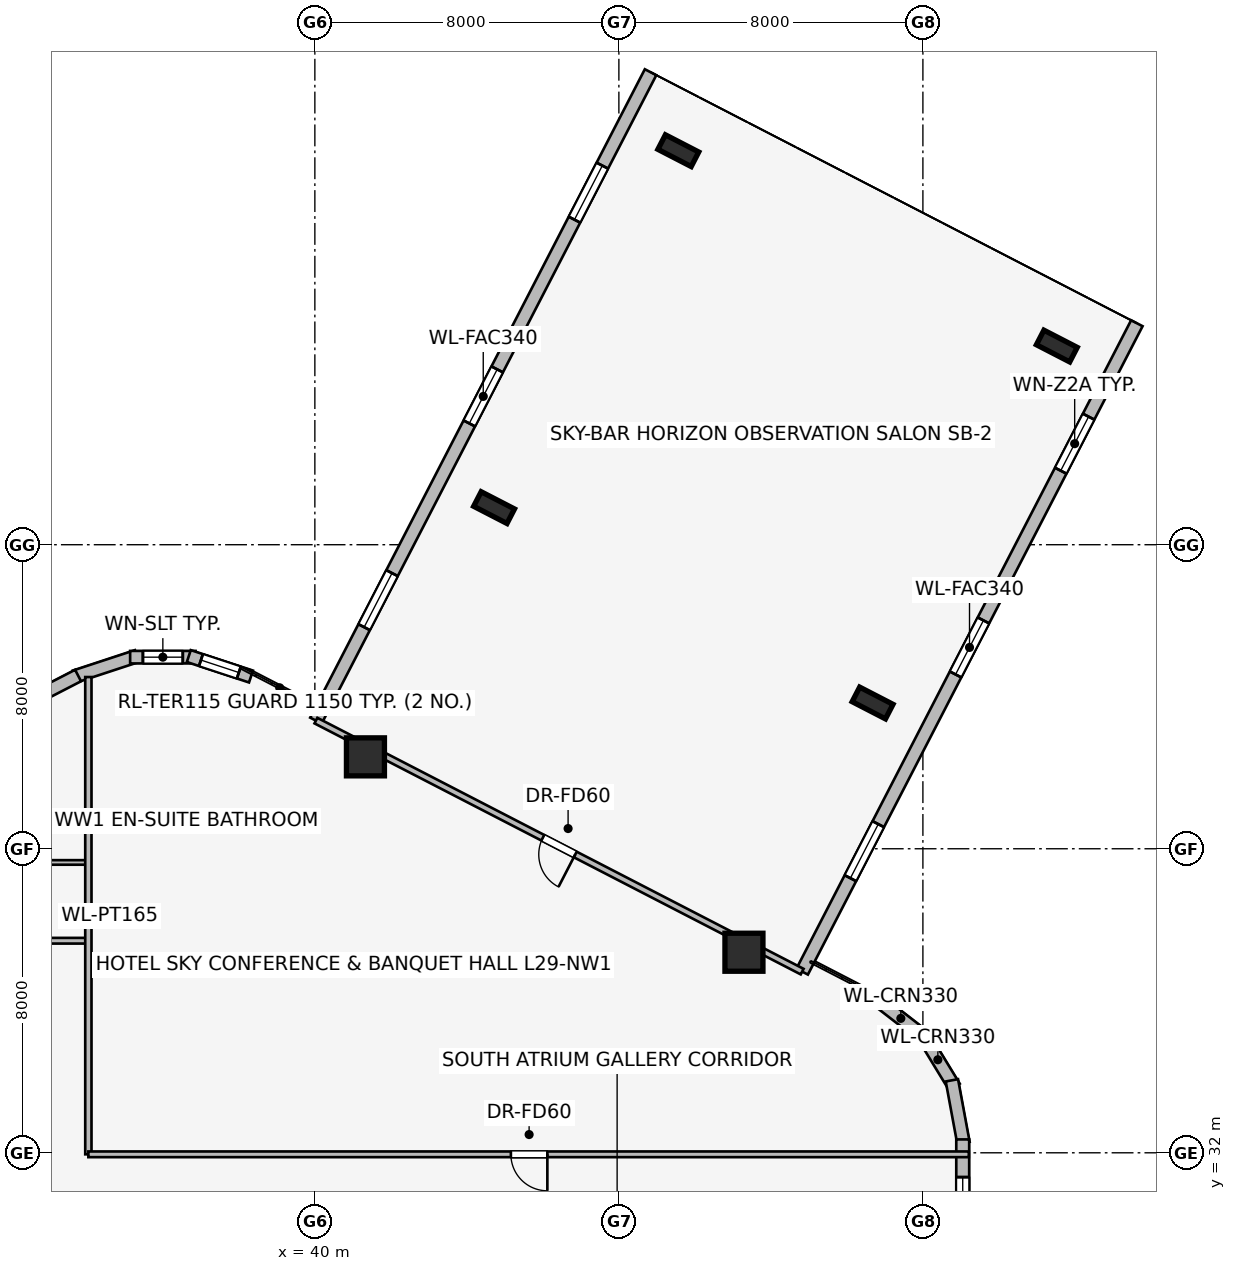
"""IFC4 building model, lengths in metres.
Left out: names, types, materials, properties, quantities, classifications, styles, units other than length and angle.
Written with IfcOpenShell. Run it as: python <this file> out.ifc"""

import sys

from ifc_helpers import new_model, si_unit, direction, frame, frame_2d, origin, origin_2d, place, context, subcontext, project, spatial, rectangle, i_section, extrude, element, fill, save


model = new_model("IFC4")
c1 = context("Model", 3, precision=1e-05, world=origin(), true_north=direction((0.0, 1.0)))
c2 = subcontext(c1, "Body", "Model", "MODEL_VIEW")
j1 = project(units=[si_unit("LENGTHUNIT", "METRE"), si_unit("PLANEANGLEUNIT", "RADIAN")], contexts=[c1])
p1 = place(None, origin())
s1 = spatial("IfcSite", under=j1, at=p1, CompositionType="ELEMENT")
p2 = place(p1, origin())
s2 = spatial("IfcBuilding", under=s1, at=p2, CompositionType="ELEMENT")
p3 = place(p2, frame((0.0, 0.0, 111.9)))
s3 = spatial("IfcBuildingStorey", under=s2, at=p3, CompositionType="ELEMENT", Elevation=111.9)
for number, where, z_axis, x_axis in (
    (1, (51.291, 37.277, 0.0), (0.0, 0.0, 1.0), (1.0, 0.0, 0.0)),
    (2, (41.331, 42.418, 0.0), (0.0, 0.0, 1.0), (1.0, 0.0, 0.0)),
):
    element("IfcColumn", number, at=place(p3, frame(where, z_axis=z_axis, x_axis=x_axis)), inside=s3, PredefinedType="COLUMN", context=c2, shape_type="SweptSolid", body=[
        extrude(rectangle(XDim=1.0, YDim=1.0, at=origin_2d()), origin(), (0.0, 0.0, 1.0), 3.45),
    ])
for number, where, z_axis, x_axis in (
    (3, (54.676, 43.835, -0.29), (0.0, 0.0, 1.0), (0.459, 0.889, 0.0)),
    (4, (44.716, 48.976, -0.29), (0.0, 0.0, 1.0), (0.459, 0.889, 0.0)),
    (5, (59.524, 53.227, -0.29), (0.0, 0.0, 1.0), (0.459, 0.889, 0.0)),
    (6, (49.564, 58.368, -0.29), (0.0, 0.0, 1.0), (0.459, 0.889, 0.0)),
):
    element("IfcColumn", number, at=place(p3, frame(where, z_axis=z_axis, x_axis=x_axis)), inside=s3, PredefinedType="COLUMN", context=c2, shape_type="SweptSolid", body=[
        extrude(i_section(OverallWidth=0.431, OverallDepth=0.987, WebThickness=0.034, FlangeThickness=0.062, at=origin_2d()), origin(), (0.0, 0.0, 1.0), 3.74),
    ])
p4 = place(p3, frame((54.757, 36.05, 0.0), z_axis=(0.0, 0.0, 1.0), x_axis=(0.790621329885, -0.612305408053, 0.0)))
e7 = element("IfcWall", 7, at=p4, inside=s3, PredefinedType="STANDARD", context=c2, shape_type="SweptSolid", body=[
    extrude(rectangle(XDim=1.676, YDim=0.33, at=frame_2d((0.838, 0.0))), origin(), (0.0, 0.0, 1.0), 3.16),
])
p5 = place(p3, frame((55.957, 35.164, 0.0), z_axis=(0.0, 0.0, 1.0), x_axis=(0.520519429557, -0.853849824883, 0.0)))
e8 = element("IfcWall", 8, at=p5, inside=s3, PredefinedType="STANDARD", context=c2, shape_type="SweptSolid", body=[
    extrude(rectangle(XDim=1.677, YDim=0.33, at=frame_2d((0.839, 0.0))), origin(), (0.0, 0.0, 1.0), 3.16),
])
p6 = place(p3, frame((56.763, 33.907, 0.0), z_axis=(0.0, 0.0, 1.0), x_axis=(0.181984991895, -0.983301308209, 0.0)))
e9 = element("IfcWall", 9, at=p6, inside=s3, PredefinedType="STANDARD", context=c2, shape_type="SweptSolid", body=[
    extrude(rectangle(XDim=1.677, YDim=0.33, at=frame_2d((0.838, 0.0))), origin(), (0.0, 0.0, 1.0), 3.16),
])
p7 = place(p3, frame((61.63, 53.828, 0.0), z_axis=(0.0, 0.0, 1.0), x_axis=(-0.458697010696, -0.888592737073, 0.0)))
e10 = element("IfcWall", 10, at=p7, inside=s3, PredefinedType="STANDARD", context=c2, shape_type="SweptSolid", body=[
    extrude(rectangle(XDim=19.2, YDim=0.34, at=frame_2d((9.6, 0.0))), origin(), (0.0, 0.0, 1.0), 3.16),
])
p8 = place(p7, frame((2.767, 0.0, 0.75)))
e11 = element("IfcOpeningElement", 11, at=p8, cuts=e10, PredefinedType="OPENING", context=c2, shape_type="SweptSolid", body=[
    extrude(rectangle(XDim=1.6, YDim=1.55, at=frame_2d((0.8, 0.775))), frame((0.0, 0.18, 0.0), z_axis=(0.0, -1.0, 0.0), x_axis=(1.0, 0.0, 0.0)), (0.0, 0.0, 1.0), 0.36),
])
p9 = place(p7, frame((8.8, 0.0, 0.75)))
e12 = element("IfcOpeningElement", 12, at=p9, cuts=e10, PredefinedType="OPENING", context=c2, shape_type="SweptSolid", body=[
    extrude(rectangle(XDim=1.6, YDim=1.55, at=frame_2d((0.8, 0.775))), frame((0.0, 0.18, 0.0), z_axis=(0.0, -1.0, 0.0), x_axis=(1.0, 0.0, 0.0)), (0.0, 0.0, 1.0), 0.36),
])
p10 = place(p7, frame((14.833, 0.0, 0.75)))
e13 = element("IfcOpeningElement", 13, at=p10, cuts=e10, PredefinedType="OPENING", context=c2, shape_type="SweptSolid", body=[
    extrude(rectangle(XDim=1.6, YDim=1.55, at=frame_2d((0.8, 0.775))), frame((0.0, 0.18, 0.0), z_axis=(0.0, -1.0, 0.0), x_axis=(1.0, 0.0, 0.0)), (0.0, 0.0, 1.0), 0.36),
])
p11 = place(p3, frame((40.028, 43.372, 0.0), z_axis=(0.0, 0.0, 1.0), x_axis=(0.45865166523, 0.888616143215, 0.0)))
e14 = element("IfcWall", 14, at=p11, inside=s3, PredefinedType="STANDARD", context=c2, shape_type="SweptSolid", body=[
    extrude(rectangle(XDim=19.199, YDim=0.34, at=frame_2d((9.6, 0.0))), origin(), (0.0, 0.0, 1.0), 3.16),
])
p12 = place(p11, frame((2.767, 0.0, 0.75)))
e15 = element("IfcOpeningElement", 15, at=p12, cuts=e14, PredefinedType="OPENING", context=c2, shape_type="SweptSolid", body=[
    extrude(rectangle(XDim=1.6, YDim=1.55, at=frame_2d((0.8, 0.775))), frame((0.0, 0.18, 0.0), z_axis=(0.0, -1.0, 0.0), x_axis=(1.0, 0.0, 0.0)), (0.0, 0.0, 1.0), 0.36),
])
p13 = place(p11, frame((8.8, 0.0, 0.75)))
e16 = element("IfcOpeningElement", 16, at=p13, cuts=e14, PredefinedType="OPENING", context=c2, shape_type="SweptSolid", body=[
    extrude(rectangle(XDim=1.6, YDim=1.55, at=frame_2d((0.8, 0.775))), frame((0.0, 0.18, 0.0), z_axis=(0.0, -1.0, 0.0), x_axis=(1.0, 0.0, 0.0)), (0.0, 0.0, 1.0), 0.36),
])
p14 = place(p11, frame((14.833, 0.0, 0.75)))
e17 = element("IfcOpeningElement", 17, at=p14, cuts=e14, PredefinedType="OPENING", context=c2, shape_type="SweptSolid", body=[
    extrude(rectangle(XDim=1.6, YDim=1.55, at=frame_2d((0.8, 0.775))), frame((0.0, 0.18, 0.0), z_axis=(0.0, -1.0, 0.0), x_axis=(1.0, 0.0, 0.0)), (0.0, 0.0, 1.0), 0.36),
])
p15 = place(p3, frame((33.681, 44.532, 0.0), z_axis=(0.0, 0.0, 1.0), x_axis=(0.949937416267, 0.312440242569, 0.0)))
e18 = element("IfcWall", 18, at=p15, inside=s3, PredefinedType="STANDARD", context=c2, shape_type="SweptSolid", body=[
    extrude(rectangle(XDim=1.722, YDim=0.33, at=frame_2d((0.861, 0.0))), origin(), (0.0, 0.0, 1.0), 3.16),
])
p16 = place(p3, frame((35.139, 45.041, 0.0), z_axis=(0.0, 0.0, 1.0), x_axis=(1.0, 0.0, 0.0)))
e19 = element("IfcWall", 19, at=p16, inside=s3, PredefinedType="STANDARD", context=c2, shape_type="SweptSolid", body=[
    extrude(rectangle(XDim=1.722, YDim=0.33, at=frame_2d((0.861, 0.0))), origin(), (0.0, 0.0, 1.0), 3.16),
])
p17 = place(p16, frame((0.336, 0.0, 0.75)))
e20 = element("IfcOpeningElement", 20, at=p17, cuts=e19, PredefinedType="OPENING", context=c2, shape_type="SweptSolid", body=[
    extrude(rectangle(XDim=1.05, YDim=1.4, at=frame_2d((0.525, 0.7))), frame((0.0, 0.175, 0.0), z_axis=(0.0, -1.0, 0.0), x_axis=(1.0, 0.0, 0.0)), (0.0, 0.0, 1.0), 0.35),
])
p18 = place(p3, frame((36.683, 45.07, 0.0), z_axis=(0.0, 0.0, 1.0), x_axis=(0.949937416267, -0.312440242569, 0.0)))
e21 = element("IfcWall", 21, at=p18, inside=s3, PredefinedType="STANDARD", context=c2, shape_type="SweptSolid", body=[
    extrude(rectangle(XDim=1.722, YDim=0.33, at=frame_2d((0.861, 0.0))), origin(), (0.0, 0.0, 1.0), 3.16),
])
p19 = place(p18, frame((0.336, 0.0, 0.75)))
e22 = element("IfcOpeningElement", 22, at=p19, cuts=e21, PredefinedType="OPENING", context=c2, shape_type="SweptSolid", body=[
    extrude(rectangle(XDim=1.05, YDim=1.4, at=frame_2d((0.525, 0.7))), frame((0.0, 0.175, 0.0), z_axis=(0.0, -1.0, 0.0), x_axis=(1.0, 0.0, 0.0)), (0.0, 0.0, 1.0), 0.35),
])
p20 = place(p3, frame((17.169, 35.99, 0.0), z_axis=(0.0, 0.0, 1.0), x_axis=(0.888613612362, 0.458656568606, 0.0)))
e23 = element("IfcWall", 23, at=p20, inside=s3, PredefinedType="STANDARD", context=c2, shape_type="SweptSolid", body=[
    extrude(rectangle(XDim=18.681, YDim=0.34, at=frame_2d((9.34, 0.0))), origin(), (0.0, 0.0, 1.0), 3.16),
])
p21 = place(p20, frame((1.023, 0.0, 0.75)))
e24 = element("IfcOpeningElement", 24, at=p21, cuts=e23, PredefinedType="OPENING", context=c2, shape_type="SweptSolid", body=[
    extrude(rectangle(XDim=1.6, YDim=1.55, at=frame_2d((0.8, 0.775))), frame((0.0, 0.18, 0.0), z_axis=(0.0, -1.0, 0.0), x_axis=(1.0, 0.0, 0.0)), (0.0, 0.0, 1.0), 0.36),
])
p22 = place(p20, frame((4.981, 0.0, 0.75)))
e25 = element("IfcOpeningElement", 25, at=p22, cuts=e23, PredefinedType="OPENING", context=c2, shape_type="SweptSolid", body=[
    extrude(rectangle(XDim=2.1, YDim=1.5, at=frame_2d((1.05, 0.75))), frame((0.0, 0.18, 0.0), z_axis=(0.0, -1.0, 0.0), x_axis=(1.0, 0.0, 0.0)), (0.0, 0.0, 1.0), 0.36),
])
p23 = place(p20, frame((8.29, 0.0, 0.75)))
e26 = element("IfcOpeningElement", 26, at=p23, cuts=e23, PredefinedType="OPENING", context=c2, shape_type="SweptSolid", body=[
    extrude(rectangle(XDim=2.1, YDim=1.5, at=frame_2d((1.05, 0.75))), frame((0.0, 0.18, 0.0), z_axis=(0.0, -1.0, 0.0), x_axis=(1.0, 0.0, 0.0)), (0.0, 0.0, 1.0), 0.36),
])
p24 = place(p20, frame((11.6, 0.0, 0.75)))
e27 = element("IfcOpeningElement", 27, at=p24, cuts=e23, PredefinedType="OPENING", context=c2, shape_type="SweptSolid", body=[
    extrude(rectangle(XDim=2.1, YDim=1.5, at=frame_2d((1.05, 0.75))), frame((0.0, 0.18, 0.0), z_axis=(0.0, -1.0, 0.0), x_axis=(1.0, 0.0, 0.0)), (0.0, 0.0, 1.0), 0.36),
])
p25 = place(p20, frame((16.058, 0.0, 0.75)))
e28 = element("IfcOpeningElement", 28, at=p25, cuts=e23, PredefinedType="OPENING", context=c2, shape_type="SweptSolid", body=[
    extrude(rectangle(XDim=1.6, YDim=1.55, at=frame_2d((0.8, 0.775))), frame((0.0, 0.18, 0.0), z_axis=(0.0, -1.0, 0.0), x_axis=(1.0, 0.0, 0.0)), (0.0, 0.0, 1.0), 0.36),
])
p26 = place(p3, frame((57.048, 32.352, 0.0), z_axis=(0.0, 0.0, 1.0), x_axis=(0.0, -1.0, 0.0)))
e29 = element("IfcWall", 29, at=p26, inside=s3, PredefinedType="STANDARD", context=c2, shape_type="SweptSolid", body=[
    extrude(rectangle(XDim=16.704, YDim=0.34, at=frame_2d((8.352, 0.0))), origin(), (0.0, 0.0, 1.0), 3.16),
])
p27 = place(p26, frame((0.992, 0.0, 0.75)))
e30 = element("IfcOpeningElement", 30, at=p27, cuts=e29, PredefinedType="OPENING", context=c2, shape_type="SweptSolid", body=[
    extrude(rectangle(XDim=1.05, YDim=1.4, at=frame_2d((0.525, 0.7))), frame((0.0, 0.18, 0.0), z_axis=(0.0, -1.0, 0.0), x_axis=(1.0, 0.0, 0.0)), (0.0, 0.0, 1.0), 0.36),
])
p28 = place(p26, frame((4.935, 0.0, 0.75)))
e31 = element("IfcOpeningElement", 31, at=p28, cuts=e29, PredefinedType="OPENING", context=c2, shape_type="SweptSolid", body=[
    extrude(rectangle(XDim=2.1, YDim=1.5, at=frame_2d((1.05, 0.75))), frame((0.0, 0.18, 0.0), z_axis=(0.0, -1.0, 0.0), x_axis=(1.0, 0.0, 0.0)), (0.0, 0.0, 1.0), 0.36),
])
p29 = place(p26, frame((9.919, 0.0, 0.75)))
e32 = element("IfcOpeningElement", 32, at=p29, cuts=e29, PredefinedType="OPENING", context=c2, shape_type="SweptSolid", body=[
    extrude(rectangle(XDim=1.6, YDim=1.55, at=frame_2d((0.8, 0.775))), frame((0.0, 0.18, 0.0), z_axis=(0.0, -1.0, 0.0), x_axis=(1.0, 0.0, 0.0)), (0.0, 0.0, 1.0), 0.36),
])
p30 = place(p26, frame((14.702, 0.0, 0.75)))
e33 = element("IfcOpeningElement", 33, at=p30, cuts=e29, PredefinedType="OPENING", context=c2, shape_type="SweptSolid", body=[
    extrude(rectangle(XDim=1.05, YDim=1.4, at=frame_2d((0.525, 0.7))), frame((0.0, 0.18, 0.0), z_axis=(0.0, -1.0, 0.0), x_axis=(1.0, 0.0, 0.0)), (0.0, 0.0, 1.0), 0.36),
])
p31 = place(p3, frame((34.0, 39.64, 0.0), z_axis=(0.0, 0.0, 1.0), x_axis=(-1.0, 0.0, 0.0)))
e34 = element("IfcWall", 34, at=p31, inside=s3, PredefinedType="PARTITIONING", context=c2, shape_type="SweptSolid", body=[
    extrude(rectangle(XDim=2.34, YDim=0.12, at=frame_2d((1.17, 0.0))), origin(), (0.0, 0.0, 1.0), 2.552),
])
p32 = place(p3, frame((34.0, 37.58, 0.0), z_axis=(0.0, 0.0, 1.0), x_axis=(-1.0, 0.0, 0.0)))
e35 = element("IfcWall", 35, at=p32, inside=s3, PredefinedType="PARTITIONING", context=c2, shape_type="SweptSolid", body=[
    extrude(rectangle(XDim=13.707, YDim=0.15, at=frame_2d((6.854, 0.0))), origin(), (0.0, 0.0, 1.0), 2.627),
])
p33 = place(p32, frame((4.96, 0.0, 0.0)))
e36 = element("IfcOpeningElement", 36, at=p33, cuts=e35, PredefinedType="OPENING", context=c2, shape_type="SweptSolid", body=[
    extrude(rectangle(XDim=0.96, YDim=2.0, at=frame_2d((0.48, 1.0))), frame((0.0, 0.085, 0.0), z_axis=(0.0, -1.0, 0.0), x_axis=(1.0, 0.0, 0.0)), (0.0, 0.0, 1.0), 0.17),
])
p34 = place(p3, frame((34.04, 31.96, 0.0), z_axis=(0.0, 0.0, 1.0), x_axis=(0.0, 1.0, 0.0)))
e37 = element("IfcWall", 37, at=p34, inside=s3, PredefinedType="PARTITIONING", context=c2, shape_type="SweptSolid", body=[
    extrude(rectangle(XDim=12.558, YDim=0.165, at=frame_2d((6.279, 0.0))), origin(), (0.0, 0.0, 1.0), 3.16),
])
p35 = place(p3, frame((57.208, 31.96, 0.0), z_axis=(0.0, 0.0, 1.0), x_axis=(-1.0, 0.0, 0.0)))
e38 = element("IfcWall", 38, at=p35, inside=s3, PredefinedType="PARTITIONING", context=c2, shape_type="SweptSolid", body=[
    extrude(rectangle(XDim=23.168, YDim=0.15, at=frame_2d((11.584, 0.0))), origin(), (0.0, 0.0, 1.0), 3.16),
])
p36 = place(p35, frame((11.09, 0.0, 0.0)))
e39 = element("IfcOpeningElement", 39, at=p36, cuts=e38, PredefinedType="OPENING", context=c2, shape_type="SweptSolid", body=[
    extrude(rectangle(XDim=0.96, YDim=2.0, at=frame_2d((0.48, 1.0))), frame((0.0, 0.085, 0.0), z_axis=(0.0, -1.0, 0.0), x_axis=(1.0, 0.0, 0.0)), (0.0, 0.0, 1.0), 0.17),
])
p37 = place(p3, frame((52.823, 36.767, 0.0), z_axis=(0.0, 0.0, 1.0), x_axis=(-0.888588109751, 0.458705974683, 0.0)))
e40 = element("IfcWall", 40, at=p37, inside=s3, PredefinedType="PARTITIONING", context=c2, shape_type="SweptSolid", body=[
    extrude(rectangle(XDim=14.399, YDim=0.165, at=frame_2d((7.2, 0.0))), origin(), (0.0, 0.0, 1.0), 2.532),
])
p38 = place(p37, frame((6.72, 0.0, 0.0)))
e41 = element("IfcOpeningElement", 41, at=p38, cuts=e40, PredefinedType="OPENING", context=c2, shape_type="SweptSolid", body=[
    extrude(rectangle(XDim=0.96, YDim=2.0, at=frame_2d((0.48, 1.0))), frame((0.0, 0.093, 0.0), z_axis=(0.0, -1.0, 0.0), x_axis=(1.0, 0.0, 0.0)), (0.0, 0.0, 1.0), 0.185),
])
p39 = place(p8, origin())
e42 = element("IfcWindow", 42, at=p39, inside=s3, PartitioningType="SINGLE_PANEL", PredefinedType="WINDOW", context=c2, shape_type="SweptSolid", body=[
    extrude(rectangle(XDim=1.6, YDim=1.55, at=frame_2d((0.8, 0.775))), frame((0.0, 0.03, 0.0), z_axis=(0.0, -1.0, 0.0), x_axis=(1.0, 0.0, 0.0)), (0.0, 0.0, 1.0), 0.06),
])
fill(e11, e42)
p40 = place(p9, origin())
e43 = element("IfcWindow", 43, at=p40, inside=s3, PartitioningType="SINGLE_PANEL", PredefinedType="WINDOW", context=c2, shape_type="SweptSolid", body=[
    extrude(rectangle(XDim=1.6, YDim=1.55, at=frame_2d((0.8, 0.775))), frame((0.0, 0.03, 0.0), z_axis=(0.0, -1.0, 0.0), x_axis=(1.0, 0.0, 0.0)), (0.0, 0.0, 1.0), 0.06),
])
fill(e12, e43)
p41 = place(p10, origin())
e44 = element("IfcWindow", 44, at=p41, inside=s3, PartitioningType="SINGLE_PANEL", PredefinedType="WINDOW", context=c2, shape_type="SweptSolid", body=[
    extrude(rectangle(XDim=1.6, YDim=1.55, at=frame_2d((0.8, 0.775))), frame((0.0, 0.03, 0.0), z_axis=(0.0, -1.0, 0.0), x_axis=(1.0, 0.0, 0.0)), (0.0, 0.0, 1.0), 0.06),
])
fill(e13, e44)
p42 = place(p12, origin())
e45 = element("IfcWindow", 45, at=p42, inside=s3, PartitioningType="SINGLE_PANEL", PredefinedType="WINDOW", context=c2, shape_type="SweptSolid", body=[
    extrude(rectangle(XDim=1.6, YDim=1.55, at=frame_2d((0.8, 0.775))), frame((0.0, 0.03, 0.0), z_axis=(0.0, -1.0, 0.0), x_axis=(1.0, 0.0, 0.0)), (0.0, 0.0, 1.0), 0.06),
])
fill(e15, e45)
p43 = place(p13, origin())
e46 = element("IfcWindow", 46, at=p43, inside=s3, PartitioningType="SINGLE_PANEL", PredefinedType="WINDOW", context=c2, shape_type="SweptSolid", body=[
    extrude(rectangle(XDim=1.6, YDim=1.55, at=frame_2d((0.8, 0.775))), frame((0.0, 0.03, 0.0), z_axis=(0.0, -1.0, 0.0), x_axis=(1.0, 0.0, 0.0)), (0.0, 0.0, 1.0), 0.06),
])
fill(e16, e46)
p44 = place(p14, origin())
e47 = element("IfcWindow", 47, at=p44, inside=s3, PartitioningType="SINGLE_PANEL", PredefinedType="WINDOW", context=c2, shape_type="SweptSolid", body=[
    extrude(rectangle(XDim=1.6, YDim=1.55, at=frame_2d((0.8, 0.775))), frame((0.0, 0.03, 0.0), z_axis=(0.0, -1.0, 0.0), x_axis=(1.0, 0.0, 0.0)), (0.0, 0.0, 1.0), 0.06),
])
fill(e17, e47)
p45 = place(p17, origin())
e48 = element("IfcWindow", 48, at=p45, inside=s3, PartitioningType="SINGLE_PANEL", PredefinedType="WINDOW", context=c2, shape_type="SweptSolid", body=[
    extrude(rectangle(XDim=1.05, YDim=1.4, at=frame_2d((0.525, 0.7))), frame((0.0, 0.03, 0.0), z_axis=(0.0, -1.0, 0.0), x_axis=(1.0, 0.0, 0.0)), (0.0, 0.0, 1.0), 0.06),
])
fill(e20, e48)
p46 = place(p19, origin())
e49 = element("IfcWindow", 49, at=p46, inside=s3, PartitioningType="SINGLE_PANEL", PredefinedType="WINDOW", context=c2, shape_type="SweptSolid", body=[
    extrude(rectangle(XDim=1.05, YDim=1.4, at=frame_2d((0.525, 0.7))), frame((0.0, 0.03, 0.0), z_axis=(0.0, -1.0, 0.0), x_axis=(1.0, 0.0, 0.0)), (0.0, 0.0, 1.0), 0.06),
])
fill(e22, e49)
p47 = place(p27, origin())
e50 = element("IfcWindow", 50, at=p47, inside=s3, PartitioningType="SINGLE_PANEL", PredefinedType="WINDOW", context=c2, shape_type="SweptSolid", body=[
    extrude(rectangle(XDim=1.05, YDim=1.4, at=frame_2d((0.525, 0.7))), frame((0.0, 0.03, 0.0), z_axis=(0.0, -1.0, 0.0), x_axis=(1.0, 0.0, 0.0)), (0.0, 0.0, 1.0), 0.06),
])
fill(e30, e50)
p48 = place(p36, origin())
e51 = element("IfcDoor", 51, at=p48, inside=s3, OperationType="SINGLE_SWING_LEFT", PredefinedType="DOOR", context=c2, shape_type="SweptSolid", body=[
    extrude(rectangle(XDim=0.96, YDim=2.0, at=frame_2d((0.48, 1.0))), frame((0.0, 0.025, 0.0), z_axis=(0.0, -1.0, 0.0), x_axis=(1.0, 0.0, 0.0)), (0.0, 0.0, 1.0), 0.05),
])
fill(e39, e51)
p49 = place(p38, origin())
e52 = element("IfcDoor", 52, at=p49, inside=s3, OperationType="SINGLE_SWING_LEFT", PredefinedType="DOOR", context=c2, shape_type="SweptSolid", body=[
    extrude(rectangle(XDim=0.96, YDim=2.0, at=frame_2d((0.48, 1.0))), frame((0.0, 0.025, 0.0), z_axis=(0.0, -1.0, 0.0), x_axis=(1.0, 0.0, 0.0)), (0.0, 0.0, 1.0), 0.05),
])
fill(e41, e52)
save(model, sys.argv[1])
